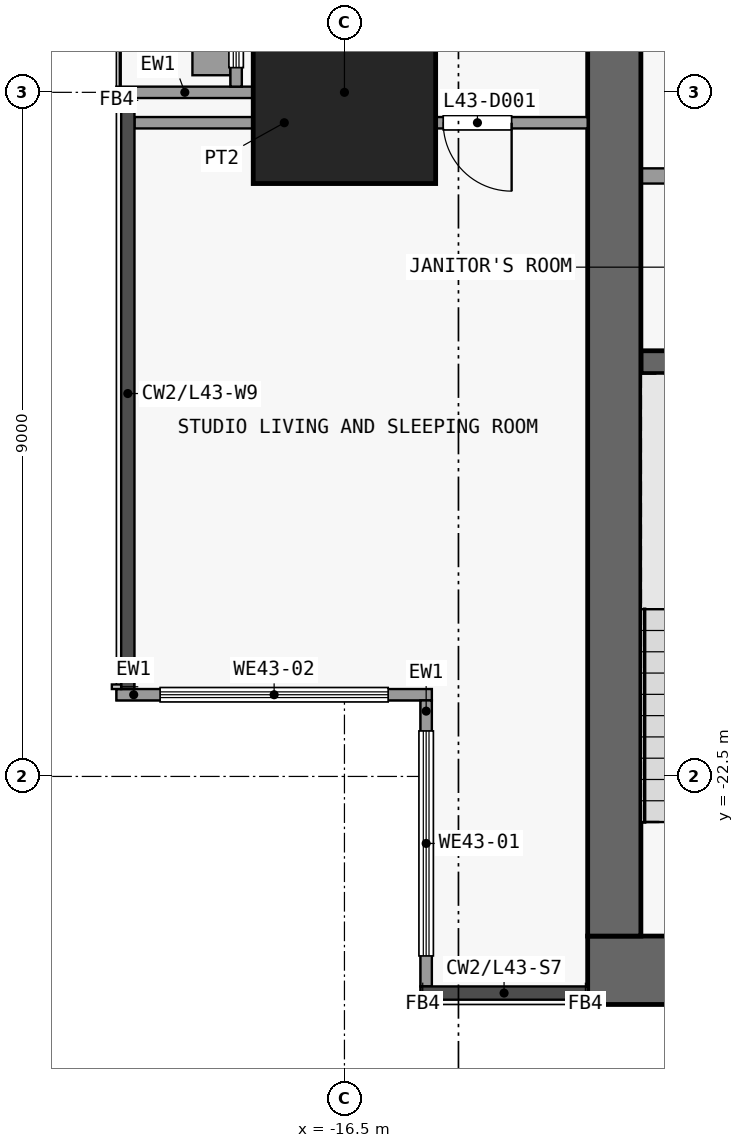
"""IFC4 building model, lengths in metres.
Left out: names, types, materials, properties, quantities, classifications, styles, units other than length and angle.
Written with IfcOpenShell. Run it as: python <this file> out.ifc"""

import sys

from ifc_helpers import new_model, si_unit, direction, frame, frame_2d, origin, origin_2d, place, context, subcontext, project, spatial, rectangle, extrude, element, fill, save


model = new_model("IFC4")
c1 = context("Model", 3, precision=1e-05, world=origin(), true_north=direction((0.0, 1.0)))
c2 = subcontext(c1, "Body", "Model", "MODEL_VIEW")
j1 = project(units=[si_unit("LENGTHUNIT", "METRE"), si_unit("PLANEANGLEUNIT", "RADIAN")], contexts=[c1])
p1 = place(None, origin())
s1 = spatial("IfcSite", under=j1, at=p1, CompositionType="ELEMENT")
p2 = place(p1, origin())
s2 = spatial("IfcBuilding", under=s1, at=p2, CompositionType="ELEMENT")
p3 = place(p2, frame((0.0, 0.0, 174.5)))
s3 = spatial("IfcBuildingStorey", under=s2, at=p3, CompositionType="ELEMENT", Elevation=174.5)
p4 = place(p3, frame((-16.5, -13.5, 0.0), z_axis=(0.0, 0.0, 1.0), x_axis=(1.0, 0.0, 0.0)))
e1 = element("IfcColumn", 1, at=p4, inside=s3, PredefinedType="COLUMN", context=c2, shape_type="SweptSolid", body=[
    extrude(rectangle(XDim=2.4, YDim=2.4, at=origin_2d()), origin(), (0.0, 0.0, 1.0), 3.6),
])
p5 = place(p3, frame((-13.3, -25.05, 0.0), z_axis=(0.0, 0.0, 1.0), x_axis=(1.0, 0.0, 0.0)))
e2 = element("IfcWall", 2, at=p5, inside=s3, PredefinedType="SHEAR", context=c2, shape_type="SweptSolid", body=[
    extrude(rectangle(XDim=26.6, YDim=0.9, at=frame_2d((13.3, 0.0))), origin(), (0.0, 0.0, 1.0), 3.3),
])
p6 = place(p3, frame((-12.95, -24.6, 0.0), z_axis=(0.0, 0.0, 1.0), x_axis=(0.0, 1.0, 0.0)))
e3 = element("IfcWall", 3, at=p6, inside=s3, PredefinedType="SHEAR", context=c2, shape_type="SweptSolid", body=[
    extrude(rectangle(XDim=16.1, YDim=0.7, at=frame_2d((8.05, 0.0))), origin(), (0.0, 0.0, 1.0), 3.3),
])
p7 = place(p3, frame((-12.6, -17.05, 0.0), z_axis=(0.0, 0.0, 1.0), x_axis=(1.0, 0.0, 0.0)))
e4 = element("IfcWall", 4, at=p7, inside=s3, PredefinedType="SHEAR", context=c2, shape_type="SweptSolid", body=[
    extrude(rectangle(XDim=3.1, YDim=0.3, at=frame_2d((1.55, 0.0))), origin(), (0.0, 0.0, 1.0), 3.3),
])
p8 = place(p3, frame((-12.6, -14.6, 0.0), z_axis=(0.0, 0.0, 1.0), x_axis=(1.0, 0.0, 0.0)))
e5 = element("IfcWall", 5, at=p8, inside=s3, PredefinedType="PARTITIONING", context=c2, shape_type="SweptSolid", body=[
    extrude(rectangle(XDim=1.45, YDim=0.2, at=frame_2d((0.725, 0.0))), origin(), (0.0, 0.0, 1.0), 3.3),
])
p9 = place(p3, frame((-15.425, -25.262, 0.0), z_axis=(0.0, 0.0, 1.0), x_axis=(0.0, 1.0, 0.0)))
e6 = element("IfcWall", 6, at=p9, inside=s3, PredefinedType="SOLIDWALL", context=c2, shape_type="SweptSolid", body=[
    extrude(rectangle(XDim=3.762, YDim=0.15, at=frame_2d((1.881, 0.0))), origin(), (0.0, 0.0, 1.0), 3.3),
])
p10 = place(p9, frame((0.401, 0.0, 0.9)))
e7 = element("IfcOpeningElement", 7, at=p10, cuts=e6, PredefinedType="OPENING", context=c2, shape_type="SweptSolid", body=[
    extrude(rectangle(XDim=2.96, YDim=2.4, at=frame_2d((1.48, 1.2))), frame((0.0, 0.085, 0.0), z_axis=(0.0, -1.0, 0.0), x_axis=(1.0, 0.0, 0.0)), (0.0, 0.0, 1.0), 0.17),
])
p11 = place(p3, frame((-15.35, -21.425, 0.0), z_axis=(0.0, 0.0, 1.0), x_axis=(-1.0, 0.0, 0.0)))
e8 = element("IfcWall", 8, at=p11, inside=s3, PredefinedType="SOLIDWALL", context=c2, shape_type="SweptSolid", body=[
    extrude(rectangle(XDim=4.15, YDim=0.15, at=frame_2d((2.075, 0.0))), origin(), (0.0, 0.0, 1.0), 3.3),
])
p12 = place(p11, frame((0.575, 0.0, 0.9)))
e9 = element("IfcOpeningElement", 9, at=p12, cuts=e8, PredefinedType="OPENING", context=c2, shape_type="SweptSolid", body=[
    extrude(rectangle(XDim=3.0, YDim=2.4, at=frame_2d((1.5, 1.2))), frame((0.0, 0.085, 0.0), z_axis=(0.0, -1.0, 0.0), x_axis=(1.0, 0.0, 0.0)), (0.0, 0.0, 1.0), 0.17),
])
p13 = place(p3, frame((-17.7, -13.5, 0.0), z_axis=(0.0, 0.0, 1.0), x_axis=(-1.0, 0.0, 0.0)))
e10 = element("IfcWall", 10, at=p13, inside=s3, PredefinedType="SOLIDWALL", context=c2, shape_type="SweptSolid", body=[
    extrude(rectangle(XDim=1.8, YDim=0.15, at=frame_2d((0.9, 0.0))), origin(), (0.0, 0.0, 1.0), 3.3),
])
p14 = place(p3, frame((-17.925, -13.425, 0.0), z_axis=(0.0, 0.0, 1.0), x_axis=(0.0, 1.0, 0.0)))
e11 = element("IfcWall", 11, at=p14, inside=s3, PredefinedType="SOLIDWALL", context=c2, shape_type="SweptSolid", body=[
    extrude(rectangle(XDim=8.925, YDim=0.15, at=frame_2d((4.462, 0.0))), origin(), (0.0, 0.0, 1.0), 3.3),
])
p15 = place(p14, frame((3.05, 0.0, 0.0)))
e12 = element("IfcOpeningElement", 12, at=p15, cuts=e11, PredefinedType="OPENING", context=c2, shape_type="SweptSolid", body=[
    extrude(rectangle(XDim=1.2, YDim=2.4, at=frame_2d((0.6, 1.2))), frame((0.0, 0.085, 0.0), z_axis=(0.0, -1.0, 0.0), x_axis=(1.0, 0.0, 0.0)), (0.0, 0.0, 1.0), 0.17),
])
p16 = place(p14, frame((0.25, 0.0, 0.9)))
e13 = element("IfcOpeningElement", 13, at=p16, cuts=e11, PredefinedType="OPENING", context=c2, shape_type="SweptSolid", body=[
    extrude(rectangle(XDim=2.05, YDim=2.1, at=frame_2d((1.025, 1.05))), frame((0.0, 0.085, 0.0), z_axis=(0.0, -1.0, 0.0), x_axis=(1.0, 0.0, 0.0)), (0.0, 0.0, 1.0), 0.17),
])
p17 = place(p14, frame((5.775, 0.0, 0.9)))
e14 = element("IfcOpeningElement", 14, at=p17, cuts=e11, PredefinedType="OPENING", context=c2, shape_type="SweptSolid", body=[
    extrude(rectangle(XDim=2.312, YDim=2.1, at=frame_2d((1.156, 1.05))), frame((0.0, 0.085, 0.0), z_axis=(0.0, -1.0, 0.0), x_axis=(1.0, 0.0, 0.0)), (0.0, 0.0, 1.0), 0.17),
])
p18 = place(p3, frame((-18.25, -13.275, 0.0), z_axis=(0.0, 0.0, 1.0), x_axis=(0.0, 1.0, 0.0)))
e15 = element("IfcWall", 15, at=p18, inside=s3, PredefinedType="USERDEFINED", context=c2, shape_type="SweptSolid", body=[
    extrude(rectangle(XDim=1.2, YDim=0.5, at=frame_2d((0.6, 0.0))), origin(), (0.0, 0.0, 1.0), 0.9),
])
p19 = place(p3, frame((-19.262, -13.9, 0.0), z_axis=(0.0, 0.0, 1.0), x_axis=(1.0, 0.0, 0.0)))
e16 = element("IfcWall", 16, at=p19, inside=s3, PredefinedType="PARTITIONING", context=c2, shape_type="SweptSolid", body=[
    extrude(rectangle(XDim=5.962, YDim=0.15, at=frame_2d((2.981, 0.0))), origin(), (0.0, 0.0, 1.0), 3.3),
])
p20 = place(p19, frame((4.062, 0.0, 0.0)))
e17 = element("IfcOpeningElement", 17, at=p20, cuts=e16, PredefinedType="OPENING", context=c2, shape_type="SweptSolid", body=[
    extrude(rectangle(XDim=0.9, YDim=2.1, at=frame_2d((0.45, 1.05))), frame((0.0, 0.085, 0.0), z_axis=(0.0, -1.0, 0.0), x_axis=(1.0, 0.0, 0.0)), (0.0, 0.0, 1.0), 0.17),
])
p21 = place(p3, frame((-16.3, -13.825, 0.0), z_axis=(0.0, 0.0, 1.0), x_axis=(0.0, 1.0, 0.0)))
e18 = element("IfcWall", 18, at=p21, inside=s3, PredefinedType="PARTITIONING", context=c2, shape_type="SweptSolid", body=[
    extrude(rectangle(XDim=2.85, YDim=0.15, at=frame_2d((1.425, 0.0))), origin(), (0.0, 0.0, 1.0), 3.3),
])
p22 = place(p10, origin())
e19 = element("IfcWindow", 19, at=p22, inside=s3, PartitioningType="SINGLE_PANEL", PredefinedType="WINDOW", context=c2, shape_type="SweptSolid", body=[
    extrude(rectangle(XDim=2.96, YDim=2.4, at=frame_2d((1.48, 1.2))), frame((0.0, 0.03, 0.0), z_axis=(0.0, -1.0, 0.0), x_axis=(1.0, 0.0, 0.0)), (0.0, 0.0, 1.0), 0.06),
])
fill(e7, e19)
p23 = place(p12, origin())
e20 = element("IfcWindow", 20, at=p23, inside=s3, PartitioningType="SINGLE_PANEL", PredefinedType="WINDOW", context=c2, shape_type="SweptSolid", body=[
    extrude(rectangle(XDim=3.0, YDim=2.4, at=frame_2d((1.5, 1.2))), frame((0.0, 0.03, 0.0), z_axis=(0.0, -1.0, 0.0), x_axis=(1.0, 0.0, 0.0)), (0.0, 0.0, 1.0), 0.06),
])
fill(e9, e20)
p24 = place(p16, origin())
e21 = element("IfcWindow", 21, at=p24, inside=s3, PartitioningType="SINGLE_PANEL", PredefinedType="WINDOW", context=c2, shape_type="SweptSolid", body=[
    extrude(rectangle(XDim=2.05, YDim=2.1, at=frame_2d((1.025, 1.05))), frame((0.0, 0.03, 0.0), z_axis=(0.0, -1.0, 0.0), x_axis=(1.0, 0.0, 0.0)), (0.0, 0.0, 1.0), 0.06),
])
fill(e13, e21)
p25 = place(p20, origin())
e22 = element("IfcDoor", 22, at=p25, inside=s3, OperationType="SINGLE_SWING_RIGHT", PredefinedType="DOOR", context=c2, shape_type="SweptSolid", body=[
    extrude(rectangle(XDim=0.9, YDim=2.1, at=frame_2d((0.45, 1.05))), frame((0.0, 0.025, 0.0), z_axis=(0.0, -1.0, 0.0), x_axis=(1.0, 0.0, 0.0)), (0.0, 0.0, 1.0), 0.05),
])
fill(e17, e22)
save(model, sys.argv[1])
